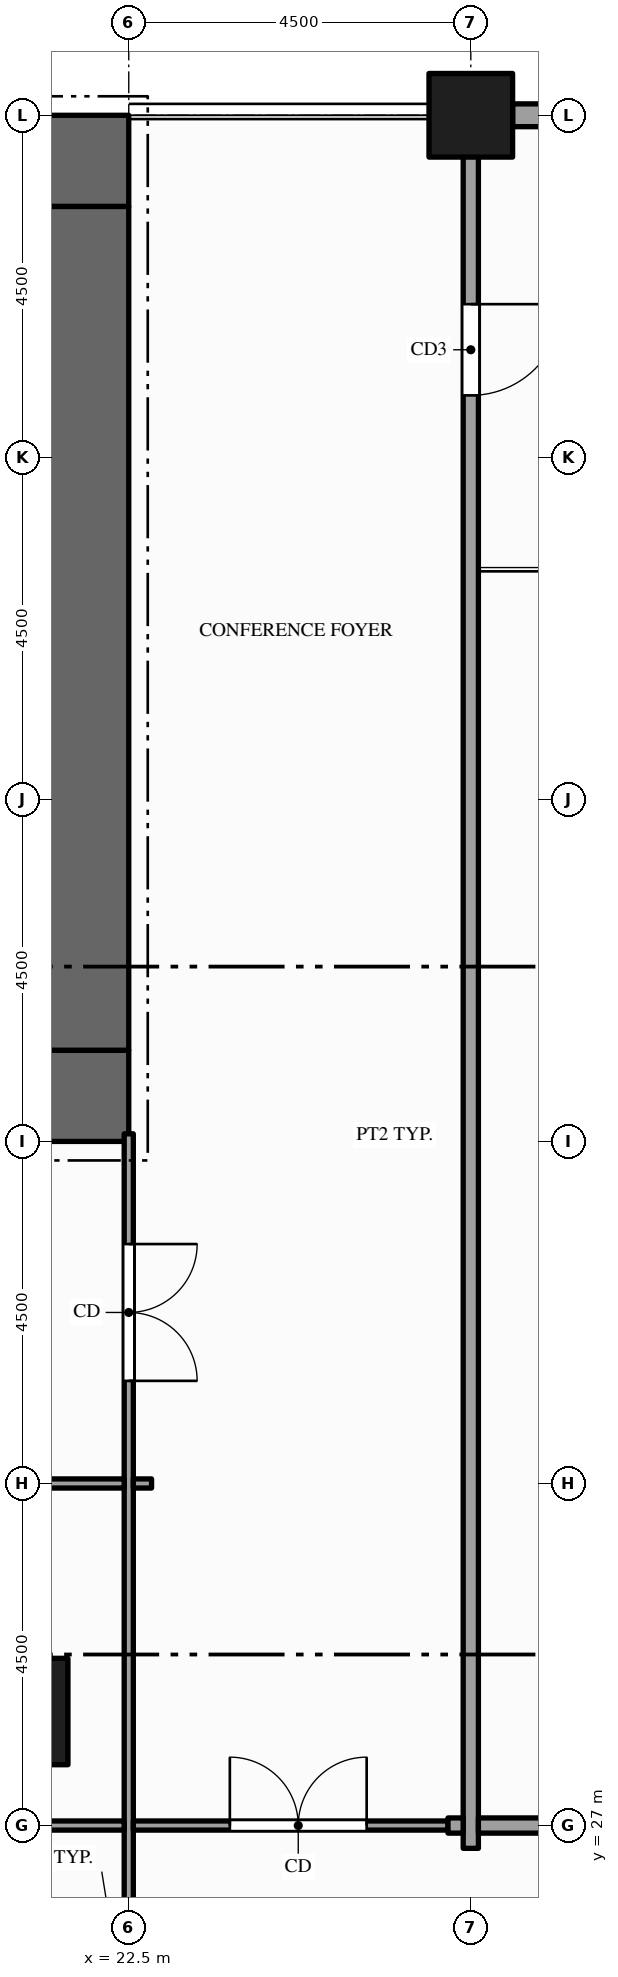
"""IFC4 building model, lengths in metres.
Left out: names, types, materials, properties, quantities, classifications, styles, units other than length and angle.
Written with IfcOpenShell. Run it as: python <this file> out.ifc"""

import sys

from ifc_helpers import new_model, si_unit, direction, frame, frame_2d, origin, origin_2d, place, context, subcontext, project, spatial, rectangle, hollow_rectangle, extrude, element, fill, save


model = new_model("IFC4")
c1 = context("Model", 3, precision=1e-05, world=origin(), true_north=direction((0.0, 1.0)))
c2 = subcontext(c1, "Body", "Model", "MODEL_VIEW")
j1 = project(units=[si_unit("LENGTHUNIT", "METRE"), si_unit("PLANEANGLEUNIT", "RADIAN")], contexts=[c1])
p1 = place(None, origin())
s1 = spatial("IfcSite", under=j1, at=p1, CompositionType="ELEMENT")
p2 = place(p1, origin())
s2 = spatial("IfcBuilding", under=s1, at=p2, CompositionType="ELEMENT")
p3 = place(p2, frame((0.0, 0.0, 8.0)))
s3 = spatial("IfcBuildingStorey", under=s2, at=p3, CompositionType="ELEMENT", Elevation=8.0)
p4 = place(p3, frame((0.0, 36.6, -0.15), z_axis=(0.0, 0.0, 1.0), x_axis=(1.0, 0.0, 0.0)))
e1 = element("IfcWall", 1, at=p4, inside=s3, PredefinedType="SHEAR", context=c2, shape_type="SweptSolid", body=[
    extrude(rectangle(XDim=22.5, YDim=1.2, at=frame_2d((11.25, 0.0))), origin(), (0.0, 0.0, 1.0), 6.0),
])
p5 = place(p4, frame((7.1, 0.0, 0.15)))
e2 = element("IfcOpeningElement", 2, at=p5, cuts=e1, PredefinedType="OPENING", context=c2, shape_type="SweptSolid", body=[
    extrude(rectangle(XDim=1.8, YDim=2.1, at=frame_2d((0.9, 1.05))), frame((0.0, 0.61, 0.0), z_axis=(0.0, -1.0, 0.0), x_axis=(1.0, 0.0, 0.0)), (0.0, 0.0, 1.0), 1.22),
])
p6 = place(p4, frame((13.15, 0.0, 0.15)))
e3 = element("IfcOpeningElement", 3, at=p6, cuts=e1, PredefinedType="OPENING", context=c2, shape_type="SweptSolid", body=[
    extrude(rectangle(XDim=1.1, YDim=2.1, at=frame_2d((0.55, 1.05))), frame((0.0, 0.61, 0.0), z_axis=(0.0, -1.0, 0.0), x_axis=(1.0, 0.0, 0.0)), (0.0, 0.0, 1.0), 1.22),
])
p7 = place(p4, frame((2.15, 0.0, 0.15)))
e4 = element("IfcOpeningElement", 4, at=p7, cuts=e1, PredefinedType="OPENING", context=c2, shape_type="SweptSolid", body=[
    extrude(rectangle(XDim=1.1, YDim=2.1, at=frame_2d((0.55, 1.05))), frame((0.0, 0.61, 0.0), z_axis=(0.0, -1.0, 0.0), x_axis=(1.0, 0.0, 0.0)), (0.0, 0.0, 1.0), 1.22),
])
p8 = place(p4, frame((19.35, 0.0, 0.15)))
e5 = element("IfcOpeningElement", 5, at=p8, cuts=e1, PredefinedType="OPENING", context=c2, shape_type="SweptSolid", body=[
    extrude(rectangle(XDim=1.1, YDim=2.1, at=frame_2d((0.55, 1.05))), frame((0.0, 0.61, 0.0), z_axis=(0.0, -1.0, 0.0), x_axis=(1.0, 0.0, 0.0)), (0.0, 0.0, 1.0), 1.22),
])
p9 = place(p3, frame((0.0, 48.9, -0.15), z_axis=(0.0, 0.0, 1.0), x_axis=(1.0, 0.0, 0.0)))
e6 = element("IfcWall", 6, at=p9, inside=s3, PredefinedType="SHEAR", context=c2, shape_type="SweptSolid", body=[
    extrude(rectangle(XDim=22.5, YDim=1.2, at=frame_2d((11.25, 0.0))), origin(), (0.0, 0.0, 1.0), 6.0),
])
p10 = place(p3, frame((21.9, 37.2, -0.15), z_axis=(0.0, 0.0, 1.0), x_axis=(0.0, 1.0, 0.0)))
e7 = element("IfcWall", 7, at=p10, inside=s3, PredefinedType="SHEAR", context=c2, shape_type="SweptSolid", body=[
    extrude(rectangle(XDim=11.1, YDim=1.2, at=frame_2d((5.55, 0.0))), origin(), (0.0, 0.0, 1.0), 6.0),
])
p11 = place(p3, frame((21.0, 28.5, -0.25), z_axis=(0.0, 0.0, 1.0), x_axis=(1.0, 0.0, 0.0)))
e8 = element("IfcColumn", 8, at=p11, inside=s3, PredefinedType="COLUMN", context=c2, shape_type="SweptSolid", body=[
    extrude(hollow_rectangle(XDim=1.4, YDim=1.4, WallThickness=0.08, at=origin_2d()), origin(), (0.0, 0.0, 1.0), 6.0),
])
p12 = place(p3, frame((27.0, 49.5, -0.25), z_axis=(0.0, 0.0, 1.0), x_axis=(1.0, 0.0, 0.0)))
e9 = element("IfcColumn", 9, at=p12, inside=s3, PredefinedType="COLUMN", context=c2, shape_type="SweptSolid", body=[
    extrude(hollow_rectangle(XDim=1.1, YDim=1.1, WallThickness=0.06, at=origin_2d()), origin(), (0.0, 0.0, 1.0), 6.0),
])
p13 = place(p3, frame((30.95, 49.5, 0.0), z_axis=(0.0, 0.0, 1.0), x_axis=(-1.0, 0.0, 0.0)))
e10 = element("IfcWall", 10, at=p13, inside=s3, PredefinedType="STANDARD", context=c2, shape_type="SweptSolid", body=[
    extrude(rectangle(XDim=3.4, YDim=0.3, at=frame_2d((1.7, 0.0))), origin(), (0.0, 0.0, 1.0), 5.036),
])
p14 = place(p13, frame((0.4, 0.0, 0.9)))
e11 = element("IfcOpeningElement", 11, at=p14, cuts=e10, PredefinedType="OPENING", context=c2, shape_type="SweptSolid", body=[
    extrude(rectangle(XDim=1.0, YDim=3.5, at=frame_2d((0.5, 1.75))), frame((0.0, 0.16, 0.0), z_axis=(0.0, -1.0, 0.0), x_axis=(1.0, 0.0, 0.0)), (0.0, 0.0, 1.0), 0.32),
])
p15 = place(p13, frame((2.0, 0.0, 0.9)))
e12 = element("IfcOpeningElement", 12, at=p15, cuts=e10, PredefinedType="OPENING", context=c2, shape_type="SweptSolid", body=[
    extrude(rectangle(XDim=1.0, YDim=3.5, at=frame_2d((0.5, 1.75))), frame((0.0, 0.16, 0.0), z_axis=(0.0, -1.0, 0.0), x_axis=(1.0, 0.0, 0.0)), (0.0, 0.0, 1.0), 0.32),
])
p16 = place(p3, frame((22.5, 0.15, 0.0), z_axis=(0.0, 0.0, 1.0), x_axis=(0.0, 1.0, 0.0)))
e13 = element("IfcWall", 13, at=p16, inside=s3, PredefinedType="PARTITIONING", context=c2, shape_type="SweptSolid", body=[
    extrude(rectangle(XDim=35.95, YDim=0.12, at=frame_2d((17.975, 0.0))), origin(), (0.0, 0.0, 1.0), 4.759),
])
p17 = place(p16, frame((9.225, 0.0, 0.0)))
e14 = element("IfcOpeningElement", 14, at=p17, cuts=e13, PredefinedType="OPENING", context=c2, shape_type="SweptSolid", body=[
    extrude(rectangle(XDim=1.5, YDim=2.1, at=frame_2d((0.75, 1.05))), frame((0.0, 0.07, 0.0), z_axis=(0.0, -1.0, 0.0), x_axis=(1.0, 0.0, 0.0)), (0.0, 0.0, 1.0), 0.14),
])
p18 = place(p16, frame((32.7, 0.0, 0.0)))
e15 = element("IfcOpeningElement", 15, at=p18, cuts=e13, PredefinedType="OPENING", context=c2, shape_type="SweptSolid", body=[
    extrude(rectangle(XDim=1.8, YDim=2.1, at=frame_2d((0.9, 1.05))), frame((0.0, 0.07, 0.0), z_axis=(0.0, -1.0, 0.0), x_axis=(1.0, 0.0, 0.0)), (0.0, 0.0, 1.0), 0.14),
])
p19 = place(p3, frame((27.0, 26.7, 0.0), z_axis=(0.0, 0.0, 1.0), x_axis=(0.0, 1.0, 0.0)))
e16 = element("IfcWall", 16, at=p19, inside=s3, PredefinedType="PARTITIONING", context=c2, shape_type="SweptSolid", body=[
    extrude(rectangle(XDim=22.65, YDim=0.2, at=frame_2d((11.325, 0.0))), origin(), (0.0, 0.0, 1.0), 4.66),
])
p20 = place(p19, frame((19.115, 0.0, 0.0)))
e17 = element("IfcOpeningElement", 17, at=p20, cuts=e16, PredefinedType="OPENING", context=c2, shape_type="SweptSolid", body=[
    extrude(rectangle(XDim=1.2, YDim=2.1, at=frame_2d((0.6, 1.05))), frame((0.0, 0.11, 0.0), z_axis=(0.0, -1.0, 0.0), x_axis=(1.0, 0.0, 0.0)), (0.0, 0.0, 1.0), 0.22),
])
p21 = place(p3, frame((11.31, 27.0, 0.0), z_axis=(0.0, 0.0, 1.0), x_axis=(1.0, 0.0, 0.0)))
e18 = element("IfcWall", 18, at=p21, inside=s3, PredefinedType="PARTITIONING", context=c2, shape_type="SweptSolid", body=[
    extrude(rectangle(XDim=11.13, YDim=0.12, at=frame_2d((5.565, 0.0))), origin(), (0.0, 0.0, 1.0), 4.5),
])
p22 = place(p3, frame((22.56, 27.0, 0.0), z_axis=(0.0, 0.0, 1.0), x_axis=(1.0, 0.0, 0.0)))
e19 = element("IfcWall", 19, at=p22, inside=s3, PredefinedType="PARTITIONING", context=c2, shape_type="SweptSolid", body=[
    extrude(rectangle(XDim=4.14, YDim=0.12, at=frame_2d((2.07, 0.0))), origin(), (0.0, 0.0, 1.0), 4.66),
])
p23 = place(p22, frame((1.27, 0.0, 0.0)))
e20 = element("IfcOpeningElement", 20, at=p23, cuts=e19, PredefinedType="OPENING", context=c2, shape_type="SweptSolid", body=[
    extrude(rectangle(XDim=1.8, YDim=2.1, at=frame_2d((0.9, 1.05))), frame((0.0, 0.07, 0.0), z_axis=(0.0, -1.0, 0.0), x_axis=(1.0, 0.0, 0.0)), (0.0, 0.0, 1.0), 0.14),
])
p24 = place(p3, frame((26.7, 27.0, 0.0), z_axis=(0.0, 0.0, 1.0), x_axis=(1.0, 0.0, 0.0)))
e21 = element("IfcWall", 21, at=p24, inside=s3, PredefinedType="PARTITIONING", context=c2, shape_type="SweptSolid", body=[
    extrude(rectangle(XDim=0.2, YDim=0.2, at=frame_2d((0.1, 0.0))), origin(), (0.0, 0.0, 1.0), 4.66),
])
p25 = place(p3, frame((27.1, 27.0, 0.0), z_axis=(0.0, 0.0, 1.0), x_axis=(1.0, 0.0, 0.0)))
e22 = element("IfcWall", 22, at=p25, inside=s3, PredefinedType="PARTITIONING", context=c2, shape_type="SweptSolid", body=[
    extrude(rectangle(XDim=26.8, YDim=0.2, at=frame_2d((13.4, 0.0))), origin(), (0.0, 0.0, 1.0), 4.66),
])
p26 = place(p3, frame((11.31, 31.5, 0.0), z_axis=(0.0, 0.0, 1.0), x_axis=(1.0, 0.0, 0.0)))
e23 = element("IfcWall", 23, at=p26, inside=s3, PredefinedType="PARTITIONING", context=c2, shape_type="SweptSolid", body=[
    extrude(rectangle(XDim=11.13, YDim=0.12, at=frame_2d((5.565, 0.0))), origin(), (0.0, 0.0, 1.0), 4.5),
])
p27 = place(p3, frame((22.56, 31.5, 0.0), z_axis=(0.0, 0.0, 1.0), x_axis=(1.0, 0.0, 0.0)))
e24 = element("IfcWall", 24, at=p27, inside=s3, PredefinedType="PARTITIONING", context=c2, shape_type="SweptSolid", body=[
    extrude(rectangle(XDim=0.24, YDim=0.12, at=frame_2d((0.12, 0.0))), origin(), (0.0, 0.0, 1.0), 4.759),
])
p28 = place(p23, origin())
e25 = element("IfcDoor", 25, at=p28, inside=s3, OperationType="DOUBLE_DOOR_SINGLE_SWING", PredefinedType="DOOR", context=c2, shape_type="SweptSolid", body=[
    extrude(rectangle(XDim=1.8, YDim=2.1, at=frame_2d((0.9, 1.05))), frame((0.0, 0.025, 0.0), z_axis=(0.0, -1.0, 0.0), x_axis=(1.0, 0.0, 0.0)), (0.0, 0.0, 1.0), 0.05),
])
fill(e20, e25)
p29 = place(p20, origin())
e26 = element("IfcDoor", 26, at=p29, inside=s3, OperationType="SINGLE_SWING_RIGHT", PredefinedType="DOOR", context=c2, shape_type="SweptSolid", body=[
    extrude(rectangle(XDim=1.2, YDim=2.1, at=frame_2d((0.6, 1.05))), frame((0.0, 0.025, 0.0), z_axis=(0.0, -1.0, 0.0), x_axis=(1.0, 0.0, 0.0)), (0.0, 0.0, 1.0), 0.05),
])
fill(e17, e26)
p30 = place(p18, origin())
e27 = element("IfcDoor", 27, at=p30, inside=s3, OperationType="DOUBLE_DOOR_SINGLE_SWING", PredefinedType="DOOR", context=c2, shape_type="SweptSolid", body=[
    extrude(rectangle(XDim=1.8, YDim=2.1, at=frame_2d((0.9, 1.05))), frame((0.0, 0.025, 0.0), z_axis=(0.0, -1.0, 0.0), x_axis=(1.0, 0.0, 0.0)), (0.0, 0.0, 1.0), 0.05),
])
fill(e15, e27)
save(model, sys.argv[1])
